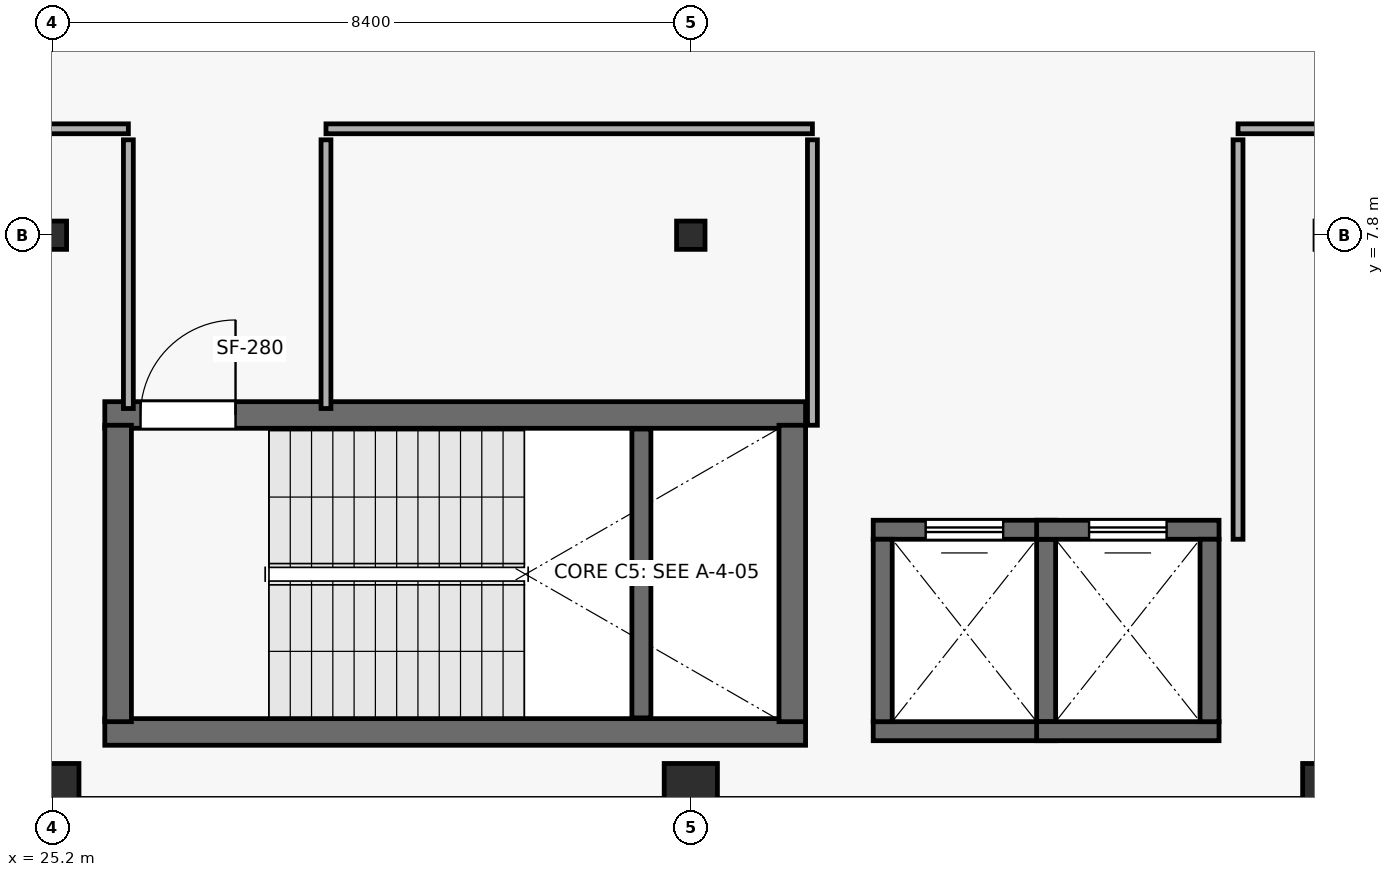
"""IFC4 building model, lengths in metres.
Left out: names, types, materials, properties, quantities, classifications, styles, units other than length and angle.
Written with IfcOpenShell. Run it as: python <this file> out.ifc"""

import sys

from ifc_helpers import new_model, si_unit, direction, frame, frame_2d, origin, origin_2d, place, context, subcontext, project, spatial, rectangle, i_section, extrude, element, fill, save


model = new_model("IFC4")
c1 = context("Model", 3, precision=1e-05, world=origin(), true_north=direction((0.0, 1.0)))
c2 = subcontext(c1, "Body", "Model", "MODEL_VIEW")
j1 = project(units=[si_unit("LENGTHUNIT", "METRE"), si_unit("PLANEANGLEUNIT", "RADIAN")], contexts=[c1])
p1 = place(None, origin())
s1 = spatial("IfcSite", under=j1, at=p1, CompositionType="ELEMENT")
p2 = place(p1, origin())
s2 = spatial("IfcBuilding", under=s1, at=p2, CompositionType="ELEMENT")
p3 = place(p2, frame((0.0, 0.0, 5.4)))
s3 = spatial("IfcBuildingStorey", under=s2, at=p3, CompositionType="ELEMENT", Elevation=5.4)
p4 = place(p3, frame((25.2, 0.5, 0.0), z_axis=(0.0, 0.0, 1.0), x_axis=(1.0, 0.0, 0.0)))
e1 = element("IfcColumn", 1, at=p4, inside=s3, PredefinedType="COLUMN", context=c2, shape_type="SweptSolid", body=[
    extrude(rectangle(XDim=0.7, YDim=0.7, at=origin_2d()), origin(), (0.0, 0.0, 1.0), 4.8),
])
p5 = place(p3, frame((25.2, 7.8, 0.0), z_axis=(0.0, 0.0, 1.0), x_axis=(1.0, 0.0, 0.0)))
e2 = element("IfcColumn", 2, at=p5, inside=s3, PredefinedType="COLUMN", context=c2, shape_type="SweptSolid", body=[
    extrude(i_section(OverallWidth=0.374, OverallDepth=0.372, WebThickness=0.016, FlangeThickness=0.026, at=origin_2d()), origin(), (0.0, 0.0, 1.0), 4.8),
])
p6 = place(p3, frame((33.6, 0.5, 0.0), z_axis=(0.0, 0.0, 1.0), x_axis=(1.0, 0.0, 0.0)))
e3 = element("IfcColumn", 3, at=p6, inside=s3, PredefinedType="COLUMN", context=c2, shape_type="SweptSolid", body=[
    extrude(rectangle(XDim=0.7, YDim=0.7, at=origin_2d()), origin(), (0.0, 0.0, 1.0), 4.8),
])
p7 = place(p3, frame((33.6, 7.8, 0.0), z_axis=(0.0, 0.0, 1.0), x_axis=(1.0, 0.0, 0.0)))
e4 = element("IfcColumn", 4, at=p7, inside=s3, PredefinedType="COLUMN", context=c2, shape_type="SweptSolid", body=[
    extrude(i_section(OverallWidth=0.374, OverallDepth=0.372, WebThickness=0.016, FlangeThickness=0.026, at=origin_2d()), origin(), (0.0, 0.0, 1.0), 4.8),
])
p8 = place(p3, frame((42.0, 0.5, 0.0), z_axis=(0.0, 0.0, 1.0), x_axis=(1.0, 0.0, 0.0)))
e5 = element("IfcColumn", 5, at=p8, inside=s3, PredefinedType="COLUMN", context=c2, shape_type="SweptSolid", body=[
    extrude(rectangle(XDim=0.7, YDim=0.7, at=origin_2d()), origin(), (0.0, 0.0, 1.0), 4.8),
])
p9 = place(p3, frame((25.89, 1.265, 0.0), z_axis=(0.0, 0.0, 1.0), x_axis=(1.0, 0.0, 0.0)))
e6 = element("IfcWall", 6, at=p9, inside=s3, PredefinedType="SHEAR", context=c2, shape_type="SweptSolid", body=[
    extrude(rectangle(XDim=9.22, YDim=0.35, at=frame_2d((4.61, 0.0))), origin(), (0.0, 0.0, 1.0), 4.52),
])
p10 = place(p3, frame((35.11, 5.435, 0.0), z_axis=(0.0, 0.0, 1.0), x_axis=(-1.0, 0.0, 0.0)))
e7 = element("IfcWall", 7, at=p10, inside=s3, PredefinedType="SHEAR", context=c2, shape_type="SweptSolid", body=[
    extrude(rectangle(XDim=9.22, YDim=0.35, at=frame_2d((4.61, 0.0))), origin(), (0.0, 0.0, 1.0), 4.52),
])
p11 = place(p10, frame((7.5, 0.0, 0.0)))
e8 = element("IfcOpeningElement", 8, at=p11, cuts=e7, PredefinedType="OPENING", context=c2, shape_type="SweptSolid", body=[
    extrude(rectangle(XDim=1.25, YDim=2.2, at=frame_2d((0.625, 1.1))), frame((0.0, 0.185, 0.0), z_axis=(0.0, -1.0, 0.0), x_axis=(1.0, 0.0, 0.0)), (0.0, 0.0, 1.0), 0.37),
])
for number, where, z_axis, x_axis in (
    (9, (26.065, 1.4, 0.0), (0.0, 0.0, 1.0), (0.0, 1.0, 0.0)),
    (10, (34.935, 5.3, 0.0), (0.0, 0.0, 1.0), (0.0, -1.0, 0.0)),
):
    element("IfcWall", number, at=place(p3, frame(where, z_axis=z_axis, x_axis=x_axis)), inside=s3, PredefinedType="SHEAR", context=c2, shape_type="SweptSolid", body=[
        extrude(rectangle(XDim=3.9, YDim=0.35, at=frame_2d((1.95, 0.0))), origin(), (0.0, 0.0, 1.0), 4.52),
    ])
p12 = place(p3, frame((32.95, 1.45, 0.0), z_axis=(0.0, 0.0, 1.0), x_axis=(0.0, 1.0, 0.0)))
e11 = element("IfcWall", 11, at=p12, inside=s3, PredefinedType="SHEAR", context=c2, shape_type="SweptSolid", body=[
    extrude(rectangle(XDim=3.8, YDim=0.25, at=frame_2d((1.9, 0.0))), origin(), (0.0, 0.0, 1.0), 2.22),
])
p13 = place(p3, frame((36.0, 1.275, 0.0), z_axis=(0.0, 0.0, 1.0), x_axis=(1.0, 0.0, 0.0)))
e12 = element("IfcWall", 12, at=p13, inside=s3, PredefinedType="SHEAR", context=c2, shape_type="SweptSolid", body=[
    extrude(rectangle(XDim=2.4, YDim=0.25, at=frame_2d((1.2, 0.0))), origin(), (0.0, 0.0, 1.0), 4.52),
])
p14 = place(p3, frame((38.4, 3.925, 0.0), z_axis=(0.0, 0.0, 1.0), x_axis=(-1.0, 0.0, 0.0)))
e13 = element("IfcWall", 13, at=p14, inside=s3, PredefinedType="SHEAR", context=c2, shape_type="SweptSolid", body=[
    extrude(rectangle(XDim=2.4, YDim=0.25, at=frame_2d((1.2, 0.0))), origin(), (0.0, 0.0, 1.0), 4.52),
])
p15 = place(p14, frame((0.69, 0.0, 0.0)))
e14 = element("IfcOpeningElement", 14, at=p15, cuts=e13, PredefinedType="OPENING", context=c2, shape_type="SweptSolid", body=[
    extrude(rectangle(XDim=1.02, YDim=2.15, at=frame_2d((0.51, 1.075))), frame((0.0, 0.135, 0.0), z_axis=(0.0, -1.0, 0.0), x_axis=(1.0, 0.0, 0.0)), (0.0, 0.0, 1.0), 0.27),
])
for number, where, z_axis, x_axis in (
    (15, (36.125, 1.4, 0.0), (0.0, 0.0, 1.0), (0.0, 1.0, 0.0)),
    (16, (38.275, 3.8, 0.0), (0.0, 0.0, 1.0), (0.0, -1.0, 0.0)),
    (17, (38.15, 1.275, 0.0), (0.0, 0.0, 1.0), (1.0, 0.0, 0.0)),
):
    element("IfcWall", number, at=place(p3, frame(where, z_axis=z_axis, x_axis=x_axis)), inside=s3, PredefinedType="SHEAR", context=c2, shape_type="SweptSolid", body=[
        extrude(rectangle(XDim=2.4, YDim=0.25, at=frame_2d((1.2, 0.0))), origin(), (0.0, 0.0, 1.0), 4.52),
    ])
p16 = place(p3, frame((40.55, 3.925, 0.0), z_axis=(0.0, 0.0, 1.0), x_axis=(-1.0, 0.0, 0.0)))
e18 = element("IfcWall", 18, at=p16, inside=s3, PredefinedType="SHEAR", context=c2, shape_type="SweptSolid", body=[
    extrude(rectangle(XDim=2.4, YDim=0.25, at=frame_2d((1.2, 0.0))), origin(), (0.0, 0.0, 1.0), 4.52),
])
p17 = place(p16, frame((0.69, 0.0, 0.0)))
e19 = element("IfcOpeningElement", 19, at=p17, cuts=e18, PredefinedType="OPENING", context=c2, shape_type="SweptSolid", body=[
    extrude(rectangle(XDim=1.02, YDim=2.15, at=frame_2d((0.51, 1.075))), frame((0.0, 0.135, 0.0), z_axis=(0.0, -1.0, 0.0), x_axis=(1.0, 0.0, 0.0)), (0.0, 0.0, 1.0), 0.27),
])
p18 = place(p3, frame((40.425, 3.8, 0.0), z_axis=(0.0, 0.0, 1.0), x_axis=(0.0, -1.0, 0.0)))
e20 = element("IfcWall", 20, at=p18, inside=s3, PredefinedType="SHEAR", context=c2, shape_type="SweptSolid", body=[
    extrude(rectangle(XDim=2.4, YDim=0.25, at=frame_2d((1.2, 0.0))), origin(), (0.0, 0.0, 1.0), 4.52),
])
p19 = place(p3, frame((4.8, 9.2, 0.0), z_axis=(0.0, 0.0, 1.0), x_axis=(1.0, 0.0, 0.0)))
e21 = element("IfcWall", 21, at=p19, inside=s3, PredefinedType="PARTITIONING", context=c2, shape_type="SweptSolid", body=[
    extrude(rectangle(XDim=21.4, YDim=0.13, at=frame_2d((10.7, 0.0))), origin(), (0.0, 0.0, 1.0), 4.52),
])
p20 = place(p3, frame((40.8, 9.2, 0.0), z_axis=(0.0, 0.0, 1.0), x_axis=(1.0, 0.0, 0.0)))
e22 = element("IfcWall", 22, at=p20, inside=s3, PredefinedType="PARTITIONING", context=c2, shape_type="SweptSolid", body=[
    extrude(rectangle(XDim=10.65, YDim=0.13, at=frame_2d((5.325, 0.0))), origin(), (0.0, 0.0, 1.0), 4.52),
])
p21 = place(p3, frame((28.8, 9.2, 0.0), z_axis=(0.0, 0.0, 1.0), x_axis=(1.0, 0.0, 0.0)))
e23 = element("IfcWall", 23, at=p21, inside=s3, PredefinedType="PARTITIONING", context=c2, shape_type="SweptSolid", body=[
    extrude(rectangle(XDim=6.4, YDim=0.13, at=frame_2d((3.2, 0.0))), origin(), (0.0, 0.0, 1.0), 4.52),
])
p22 = place(p3, frame((35.2, 9.055, 0.0), z_axis=(0.0, 0.0, 1.0), x_axis=(0.0, -1.0, 0.0)))
e24 = element("IfcWall", 24, at=p22, inside=s3, PredefinedType="PARTITIONING", context=c2, shape_type="SweptSolid", body=[
    extrude(rectangle(XDim=3.755, YDim=0.13, at=frame_2d((1.877, 0.0))), origin(), (0.0, 0.0, 1.0), 4.52),
])
p23 = place(p3, frame((40.8, 3.8, 0.0), z_axis=(0.0, 0.0, 1.0), x_axis=(0.0, 1.0, 0.0)))
e25 = element("IfcWall", 25, at=p23, inside=s3, PredefinedType="PARTITIONING", context=c2, shape_type="SweptSolid", body=[
    extrude(rectangle(XDim=5.255, YDim=0.13, at=frame_2d((2.627, 0.0))), origin(), (0.0, 0.0, 1.0), 4.52),
])
for number, where, z_axis, x_axis in (
    (26, (26.2, 9.055, 0.0), (0.0, 0.0, 1.0), (0.0, -1.0, 0.0)),
    (27, (28.8, 5.52, 0.0), (0.0, 0.0, 1.0), (0.0, 1.0, 0.0)),
):
    element("IfcWall", number, at=place(p3, frame(where, z_axis=z_axis, x_axis=x_axis)), inside=s3, PredefinedType="PARTITIONING", context=c2, shape_type="SweptSolid", body=[
        extrude(rectangle(XDim=3.535, YDim=0.13, at=frame_2d((1.768, 0.0))), origin(), (0.0, 0.0, 1.0), 4.52),
    ])
p24 = place(p11, origin())
e28 = element("IfcDoor", 28, at=p24, inside=s3, OperationType="SINGLE_SWING_RIGHT", PredefinedType="DOOR", context=c2, shape_type="SweptSolid", body=[
    extrude(rectangle(XDim=1.25, YDim=2.2, at=frame_2d((0.625, 1.1))), frame((0.0, 0.025, 0.0), z_axis=(0.0, -1.0, 0.0), x_axis=(1.0, 0.0, 0.0)), (0.0, 0.0, 1.0), 0.05),
])
fill(e8, e28)
p25 = place(p15, origin())
e29 = element("IfcDoor", 29, at=p25, inside=s3, OperationType="SLIDING_TO_LEFT", PredefinedType="DOOR", context=c2, shape_type="SweptSolid", body=[
    extrude(rectangle(XDim=1.02, YDim=2.15, at=frame_2d((0.51, 1.075))), frame((0.0, 0.025, 0.0), z_axis=(0.0, -1.0, 0.0), x_axis=(1.0, 0.0, 0.0)), (0.0, 0.0, 1.0), 0.05),
])
fill(e14, e29)
p26 = place(p17, origin())
e30 = element("IfcDoor", 30, at=p26, inside=s3, OperationType="SLIDING_TO_LEFT", PredefinedType="DOOR", context=c2, shape_type="SweptSolid", body=[
    extrude(rectangle(XDim=1.02, YDim=2.15, at=frame_2d((0.51, 1.075))), frame((0.0, 0.025, 0.0), z_axis=(0.0, -1.0, 0.0), x_axis=(1.0, 0.0, 0.0)), (0.0, 0.0, 1.0), 0.05),
])
fill(e19, e30)
save(model, sys.argv[1])
